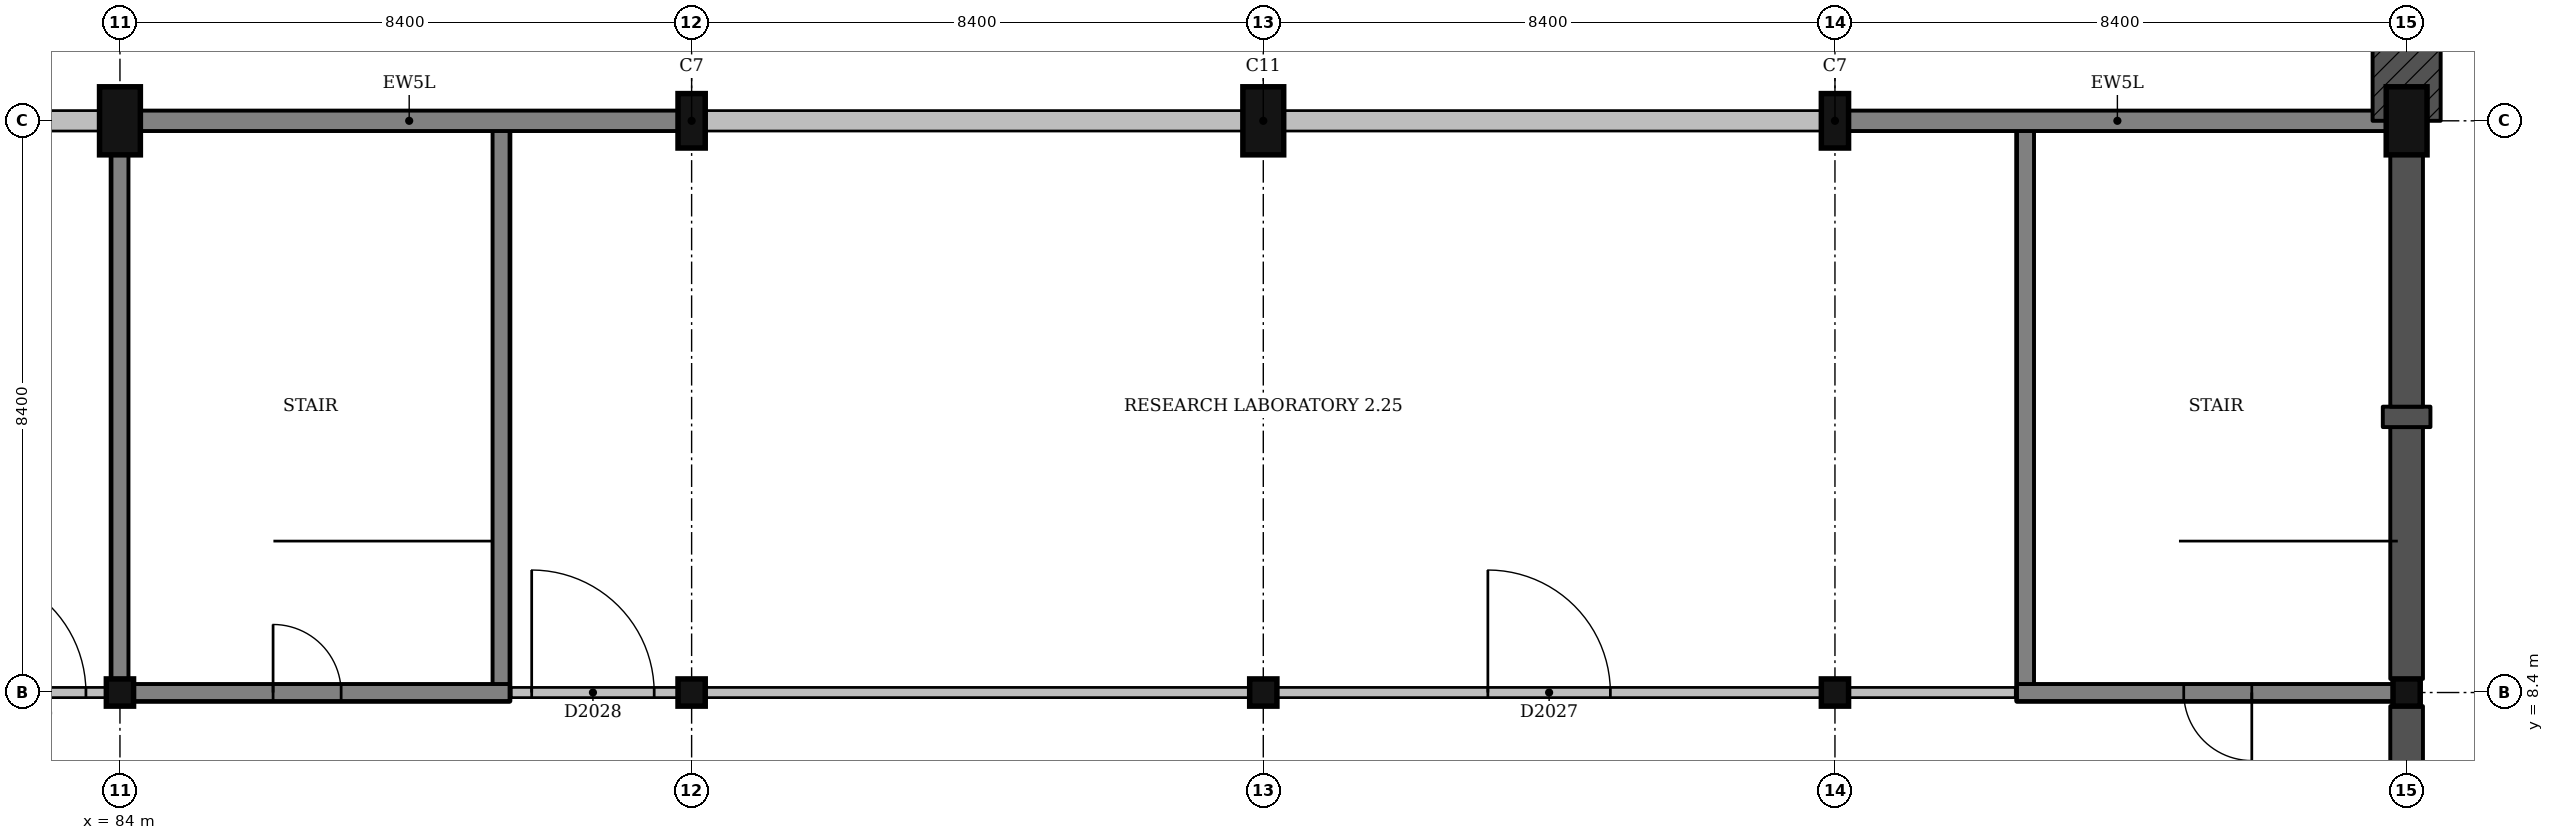
"""IFC4 building model, lengths in metres.
Left out: names, types, materials, properties, quantities, classifications, styles, units other than length and angle.
Written with IfcOpenShell. Run it as: python <this file> out.ifc"""

import sys

from ifc_helpers import new_model, si_unit, direction, frame, frame_2d, origin, origin_2d, place, context, subcontext, project, spatial, polyline, rectangle, outline, extrude, element, fill, save


model = new_model("IFC4")
c1 = context("Model", 3, precision=1e-05, world=origin(), true_north=direction((0.0, 1.0)))
c2 = subcontext(c1, "Body", "Model", "MODEL_VIEW")
j1 = project(units=[si_unit("LENGTHUNIT", "METRE"), si_unit("PLANEANGLEUNIT", "RADIAN")], contexts=[c1])
p1 = place(None, origin())
s1 = spatial("IfcSite", under=j1, at=p1, CompositionType="ELEMENT")
p2 = place(p1, origin())
s2 = spatial("IfcBuilding", under=s1, at=p2, CompositionType="ELEMENT")
p3 = place(p2, frame((0.0, 0.0, 9.0)))
s3 = spatial("IfcBuildingStorey", under=s2, at=p3, CompositionType="ELEMENT", Elevation=9.0)
p4 = place(p3, frame((84.0, 8.4, 0.0), z_axis=(0.0, 0.0, 1.0), x_axis=(1.0, 0.0, 0.0)))
e1 = element("IfcColumn", 1, at=p4, inside=s3, PredefinedType="COLUMN", context=c2, shape_type="SweptSolid", body=[
    extrude(rectangle(XDim=0.4, YDim=0.4, at=origin_2d()), origin(), (0.0, 0.0, 1.0), 4.5),
])
p5 = place(p3, frame((84.0, 16.8, 0.0), z_axis=(0.0, 0.0, 1.0), x_axis=(1.0, 0.0, 0.0)))
e2 = element("IfcColumn", 2, at=p5, inside=s3, PredefinedType="COLUMN", context=c2, shape_type="SweptSolid", body=[
    extrude(rectangle(XDim=0.6, YDim=1.0, at=origin_2d()), origin(), (0.0, 0.0, 1.0), 4.5),
])
p6 = place(p3, frame((92.4, 8.4, 0.0), z_axis=(0.0, 0.0, 1.0), x_axis=(1.0, 0.0, 0.0)))
e3 = element("IfcColumn", 3, at=p6, inside=s3, PredefinedType="COLUMN", context=c2, shape_type="SweptSolid", body=[
    extrude(rectangle(XDim=0.4, YDim=0.4, at=origin_2d()), origin(), (0.0, 0.0, 1.0), 4.5),
])
p7 = place(p3, frame((92.4, 16.8, 0.0), z_axis=(0.0, 0.0, 1.0), x_axis=(1.0, 0.0, 0.0)))
e4 = element("IfcColumn", 4, at=p7, inside=s3, PredefinedType="COLUMN", context=c2, shape_type="SweptSolid", body=[
    extrude(rectangle(XDim=0.4, YDim=0.8, at=origin_2d()), origin(), (0.0, 0.0, 1.0), 4.5),
])
p8 = place(p3, frame((100.8, 8.4, 0.0), z_axis=(0.0, 0.0, 1.0), x_axis=(1.0, 0.0, 0.0)))
e5 = element("IfcColumn", 5, at=p8, inside=s3, PredefinedType="COLUMN", context=c2, shape_type="SweptSolid", body=[
    extrude(rectangle(XDim=0.4, YDim=0.4, at=origin_2d()), origin(), (0.0, 0.0, 1.0), 4.5),
])
p9 = place(p3, frame((100.8, 16.8, 0.0), z_axis=(0.0, 0.0, 1.0), x_axis=(1.0, 0.0, 0.0)))
e6 = element("IfcColumn", 6, at=p9, inside=s3, PredefinedType="COLUMN", context=c2, shape_type="SweptSolid", body=[
    extrude(rectangle(XDim=0.6, YDim=1.0, at=origin_2d()), origin(), (0.0, 0.0, 1.0), 4.5),
])
p10 = place(p3, frame((109.2, 8.4, 0.0), z_axis=(0.0, 0.0, 1.0), x_axis=(1.0, 0.0, 0.0)))
e7 = element("IfcColumn", 7, at=p10, inside=s3, PredefinedType="COLUMN", context=c2, shape_type="SweptSolid", body=[
    extrude(rectangle(XDim=0.4, YDim=0.4, at=origin_2d()), origin(), (0.0, 0.0, 1.0), 4.5),
])
p11 = place(p3, frame((109.2, 16.8, 0.0), z_axis=(0.0, 0.0, 1.0), x_axis=(1.0, 0.0, 0.0)))
e8 = element("IfcColumn", 8, at=p11, inside=s3, PredefinedType="COLUMN", context=c2, shape_type="SweptSolid", body=[
    extrude(rectangle(XDim=0.4, YDim=0.8, at=origin_2d()), origin(), (0.0, 0.0, 1.0), 4.5),
])
p12 = place(p3, frame((117.6, 8.4, 0.0), z_axis=(0.0, 0.0, 1.0), x_axis=(1.0, 0.0, 0.0)))
e9 = element("IfcColumn", 9, at=p12, inside=s3, PredefinedType="COLUMN", context=c2, shape_type="SweptSolid", body=[
    extrude(rectangle(XDim=0.4, YDim=0.4, at=origin_2d()), origin(), (0.0, 0.0, 1.0), 4.5),
])
p13 = place(p3, frame((117.6, 16.8, 0.0), z_axis=(0.0, 0.0, 1.0), x_axis=(1.0, 0.0, 0.0)))
e10 = element("IfcColumn", 10, at=p13, inside=s3, PredefinedType="COLUMN", context=c2, shape_type="SweptSolid", body=[
    extrude(rectangle(XDim=0.6, YDim=1.0, at=origin_2d()), origin(), (0.0, 0.0, 1.0), 4.5),
])
p14 = place(p3, frame((111.875, 8.4, 0.0), z_axis=(0.0, 0.0, 1.0), x_axis=(1.0, 0.0, 0.0)))
e11 = element("IfcWall", 11, at=p14, inside=s3, PredefinedType="SHEAR", context=c2, shape_type="SweptSolid", body=[
    extrude(rectangle(XDim=5.525, YDim=0.25, at=frame_2d((2.762, 0.0))), origin(), (0.0, 0.0, 1.0), 4.2),
])
p15 = place(p14, frame((2.45, 0.0, 0.0)))
e12 = element("IfcOpeningElement", 12, at=p15, cuts=e11, PredefinedType="OPENING", context=c2, shape_type="SweptSolid", body=[
    extrude(rectangle(XDim=1.0, YDim=2.1, at=frame_2d((0.5, 1.05))), frame((0.0, 0.135, 0.0), z_axis=(0.0, -1.0, 0.0), x_axis=(1.0, 0.0, 0.0)), (0.0, 0.0, 1.0), 0.27),
])
p16 = place(p3, frame((112.0, 8.525, 0.0), z_axis=(0.0, 0.0, 1.0), x_axis=(0.0, 1.0, 0.0)))
e13 = element("IfcWall", 13, at=p16, inside=s3, PredefinedType="SHEAR", context=c2, shape_type="SweptSolid", body=[
    extrude(rectangle(XDim=8.15, YDim=0.25, at=frame_2d((4.075, 0.0))), origin(), (0.0, 0.0, 1.0), 4.2),
])
p17 = place(p3, frame((84.2, 8.4, 0.0), z_axis=(0.0, 0.0, 1.0), x_axis=(1.0, 0.0, 0.0)))
e14 = element("IfcWall", 14, at=p17, inside=s3, PredefinedType="SHEAR", context=c2, shape_type="SweptSolid", body=[
    extrude(rectangle(XDim=5.525, YDim=0.25, at=frame_2d((2.763, 0.0))), origin(), (0.0, 0.0, 1.0), 4.2),
])
p18 = place(p17, frame((2.05, 0.0, 0.0)))
e15 = element("IfcOpeningElement", 15, at=p18, cuts=e14, PredefinedType="OPENING", context=c2, shape_type="SweptSolid", body=[
    extrude(rectangle(XDim=1.0, YDim=2.1, at=frame_2d((0.5, 1.05))), frame((0.0, 0.135, 0.0), z_axis=(0.0, -1.0, 0.0), x_axis=(1.0, 0.0, 0.0)), (0.0, 0.0, 1.0), 0.27),
])
p19 = place(p3, frame((84.0, 8.6, 0.0), z_axis=(0.0, 0.0, 1.0), x_axis=(0.0, 1.0, 0.0)))
e16 = element("IfcWall", 16, at=p19, inside=s3, PredefinedType="SHEAR", context=c2, shape_type="SweptSolid", body=[
    extrude(rectangle(XDim=7.7, YDim=0.25, at=frame_2d((3.85, 0.0))), origin(), (0.0, 0.0, 1.0), 4.2),
])
p20 = place(p3, frame((89.6, 8.525, 0.0), z_axis=(0.0, 0.0, 1.0), x_axis=(0.0, 1.0, 0.0)))
e17 = element("IfcWall", 17, at=p20, inside=s3, PredefinedType="SHEAR", context=c2, shape_type="SweptSolid", body=[
    extrude(rectangle(XDim=8.15, YDim=0.25, at=frame_2d((4.075, 0.0))), origin(), (0.0, 0.0, 1.0), 4.2),
])
p21 = place(p3, frame((117.6, 16.8, 2.0), z_axis=(0.0, 0.0, 1.0), x_axis=(0.0, 1.0, 0.0)))
e18 = element("IfcWall", 18, at=p21, inside=s3, PredefinedType="SOLIDWALL", context=c2, shape_type="SweptSolid", body=[
    extrude(outline(polyline([(0.0, 0.0), (33.6, 0.0), (33.6, 16.5), (31.5, 15.753), (29.4, 15.115), (27.3, 14.583), (25.2, 14.152), (23.1, 13.819), (21.0, 13.583), (18.9, 13.442), (16.8, 13.395), (14.7, 13.442), (12.6, 13.583), (10.5, 13.819), (8.4, 14.152), (6.3, 14.583), (4.2, 15.115), (2.1, 15.753), (0.0, 16.5), (0.0, 0.0)])), frame((0.0, 0.5, 0.0), z_axis=(0.0, -1.0, 0.0), x_axis=(1.0, 0.0, 0.0)), (0.0, 0.0, 1.0), 1.0),
])
p22 = place(p3, frame((117.6, 4.35, 0.0), z_axis=(0.0, 0.0, 1.0), x_axis=(0.0, 1.0, 0.0)))
e19 = element("IfcWall", 19, at=p22, inside=s3, PredefinedType="SOLIDWALL", context=c2, shape_type="SweptSolid", body=[
    extrude(rectangle(XDim=3.85, YDim=0.48, at=frame_2d((1.925, 0.0))), origin(), (0.0, 0.0, 1.0), 3.6),
])
p23 = place(p3, frame((117.6, 8.6, 0.0), z_axis=(0.0, 0.0, 1.0), x_axis=(0.0, 1.0, 0.0)))
e20 = element("IfcWall", 20, at=p23, inside=s3, PredefinedType="SOLIDWALL", context=c2, shape_type="SweptSolid", body=[
    extrude(rectangle(XDim=3.7, YDim=0.48, at=frame_2d((1.85, 0.0))), origin(), (0.0, 0.0, 1.0), 4.2),
])
p24 = place(p3, frame((117.6, 12.3, 0.0), z_axis=(0.0, 0.0, 1.0), x_axis=(0.0, 1.0, 0.0)))
e21 = element("IfcWall", 21, at=p24, inside=s3, PredefinedType="SOLIDWALL", context=c2, shape_type="SweptSolid", body=[
    extrude(rectangle(XDim=0.3, YDim=0.7, at=frame_2d((0.15, 0.0))), origin(), (0.0, 0.0, 1.0), 4.2),
])
p25 = place(p3, frame((117.6, 12.6, 0.0), z_axis=(0.0, 0.0, 1.0), x_axis=(0.0, 1.0, 0.0)))
e22 = element("IfcWall", 22, at=p25, inside=s3, PredefinedType="SOLIDWALL", context=c2, shape_type="SweptSolid", body=[
    extrude(rectangle(XDim=3.7, YDim=0.48, at=frame_2d((1.85, 0.0))), origin(), (0.0, 0.0, 1.0), 4.2),
])
p26 = place(p3, frame((117.3, 16.8, 0.0), z_axis=(0.0, 0.0, 1.0), x_axis=(-1.0, 0.0, 0.0)))
e23 = element("IfcWall", 23, at=p26, inside=s3, PredefinedType="SOLIDWALL", context=c2, shape_type="SweptSolid", body=[
    extrude(rectangle(XDim=7.9, YDim=0.3, at=frame_2d((3.95, 0.0))), origin(), (0.0, 0.0, 1.0), 3.6),
])
for number, where, z_axis, x_axis in (
    (24, (109.0, 16.8, 0.0), (0.0, 0.0, 1.0), (-1.0, 0.0, 0.0)),
    (25, (100.5, 16.8, 0.0), (0.0, 0.0, 1.0), (-1.0, 0.0, 0.0)),
    (26, (92.2, 16.8, 0.0), (0.0, 0.0, 1.0), (-1.0, 0.0, 0.0)),
    (27, (83.7, 16.8, 0.0), (0.0, 0.0, 1.0), (-1.0, 0.0, 0.0)),
):
    element("IfcWall", number, at=place(p3, frame(where, z_axis=z_axis, x_axis=x_axis)), inside=s3, PredefinedType="SOLIDWALL", context=c2, shape_type="SweptSolid", body=[
        extrude(rectangle(XDim=7.9, YDim=0.3, at=frame_2d((3.95, 0.0))), origin(), (0.0, 0.0, 1.0), 3.6),
    ])
p27 = place(p3, frame((75.8, 8.4, 0.0), z_axis=(0.0, 0.0, 1.0), x_axis=(1.0, 0.0, 0.0)))
e28 = element("IfcWall", 28, at=p27, inside=s3, PredefinedType="PARTITIONING", context=c2, shape_type="SweptSolid", body=[
    extrude(rectangle(XDim=8.0, YDim=0.15, at=frame_2d((4.0, 0.0))), origin(), (0.0, 0.0, 1.0), 3.6),
])
p28 = place(p27, frame((5.9, 0.0, 0.0)))
e29 = element("IfcOpeningElement", 29, at=p28, cuts=e28, PredefinedType="OPENING", context=c2, shape_type="SweptSolid", body=[
    extrude(rectangle(XDim=1.8, YDim=2.1, at=frame_2d((0.9, 1.05))), frame((0.0, 0.085, 0.0), z_axis=(0.0, -1.0, 0.0), x_axis=(1.0, 0.0, 0.0)), (0.0, 0.0, 1.0), 0.17),
])
p29 = place(p3, frame((89.75, 8.4, 0.0), z_axis=(0.0, 0.0, 1.0), x_axis=(1.0, 0.0, 0.0)))
e30 = element("IfcWall", 30, at=p29, inside=s3, PredefinedType="PARTITIONING", context=c2, shape_type="SweptSolid", body=[
    extrude(rectangle(XDim=2.45, YDim=0.15, at=frame_2d((1.225, 0.0))), origin(), (0.0, 0.0, 1.0), 3.6),
])
p30 = place(p29, frame((0.3, 0.0, 0.0)))
e31 = element("IfcOpeningElement", 31, at=p30, cuts=e30, PredefinedType="OPENING", context=c2, shape_type="SweptSolid", body=[
    extrude(rectangle(XDim=1.8, YDim=2.1, at=frame_2d((0.9, 1.05))), frame((0.0, 0.085, 0.0), z_axis=(0.0, -1.0, 0.0), x_axis=(1.0, 0.0, 0.0)), (0.0, 0.0, 1.0), 0.17),
])
p31 = place(p3, frame((92.6, 8.4, 0.0), z_axis=(0.0, 0.0, 1.0), x_axis=(1.0, 0.0, 0.0)))
e32 = element("IfcWall", 32, at=p31, inside=s3, PredefinedType="PARTITIONING", context=c2, shape_type="SweptSolid", body=[
    extrude(rectangle(XDim=8.0, YDim=0.15, at=frame_2d((4.0, 0.0))), origin(), (0.0, 0.0, 1.0), 3.6),
])
p32 = place(p3, frame((101.0, 8.4, 0.0), z_axis=(0.0, 0.0, 1.0), x_axis=(1.0, 0.0, 0.0)))
e33 = element("IfcWall", 33, at=p32, inside=s3, PredefinedType="PARTITIONING", context=c2, shape_type="SweptSolid", body=[
    extrude(rectangle(XDim=8.0, YDim=0.15, at=frame_2d((4.0, 0.0))), origin(), (0.0, 0.0, 1.0), 3.6),
])
p33 = place(p32, frame((3.1, 0.0, 0.0)))
e34 = element("IfcOpeningElement", 34, at=p33, cuts=e33, PredefinedType="OPENING", context=c2, shape_type="SweptSolid", body=[
    extrude(rectangle(XDim=1.8, YDim=2.1, at=frame_2d((0.9, 1.05))), frame((0.0, 0.085, 0.0), z_axis=(0.0, -1.0, 0.0), x_axis=(1.0, 0.0, 0.0)), (0.0, 0.0, 1.0), 0.17),
])
p34 = place(p3, frame((109.4, 8.4, 0.0), z_axis=(0.0, 0.0, 1.0), x_axis=(1.0, 0.0, 0.0)))
e35 = element("IfcWall", 35, at=p34, inside=s3, PredefinedType="PARTITIONING", context=c2, shape_type="SweptSolid", body=[
    extrude(rectangle(XDim=2.45, YDim=0.15, at=frame_2d((1.225, 0.0))), origin(), (0.0, 0.0, 1.0), 3.6),
])
p35 = place(p28, origin())
e36 = element("IfcDoor", 36, at=p35, inside=s3, OperationType="DOUBLE_DOOR_SINGLE_SWING", PredefinedType="DOOR", context=c2, shape_type="SweptSolid", body=[
    extrude(rectangle(XDim=1.8, YDim=2.1, at=frame_2d((0.9, 1.05))), frame((0.0, 0.025, 0.0), z_axis=(0.0, -1.0, 0.0), x_axis=(1.0, 0.0, 0.0)), (0.0, 0.0, 1.0), 0.05),
])
fill(e29, e36)
p36 = place(p33, origin())
e37 = element("IfcDoor", 37, at=p36, inside=s3, OperationType="DOUBLE_DOOR_SINGLE_SWING", PredefinedType="DOOR", context=c2, shape_type="SweptSolid", body=[
    extrude(rectangle(XDim=1.8, YDim=2.1, at=frame_2d((0.9, 1.05))), frame((0.0, 0.025, 0.0), z_axis=(0.0, -1.0, 0.0), x_axis=(1.0, 0.0, 0.0)), (0.0, 0.0, 1.0), 0.05),
])
fill(e34, e37)
p37 = place(p30, origin())
e38 = element("IfcDoor", 38, at=p37, inside=s3, OperationType="DOUBLE_DOOR_SINGLE_SWING", PredefinedType="DOOR", context=c2, shape_type="SweptSolid", body=[
    extrude(rectangle(XDim=1.8, YDim=2.1, at=frame_2d((0.9, 1.05))), frame((0.0, 0.025, 0.0), z_axis=(0.0, -1.0, 0.0), x_axis=(1.0, 0.0, 0.0)), (0.0, 0.0, 1.0), 0.05),
])
fill(e31, e38)
p38 = place(p18, origin())
e39 = element("IfcDoor", 39, at=p38, inside=s3, OperationType="SINGLE_SWING_LEFT", PredefinedType="DOOR", context=c2, shape_type="SweptSolid", body=[
    extrude(rectangle(XDim=1.0, YDim=2.1, at=frame_2d((0.5, 1.05))), frame((0.0, 0.025, 0.0), z_axis=(0.0, -1.0, 0.0), x_axis=(1.0, 0.0, 0.0)), (0.0, 0.0, 1.0), 0.05),
])
fill(e15, e39)
p39 = place(p15, origin())
e40 = element("IfcDoor", 40, at=p39, inside=s3, OperationType="SINGLE_SWING_RIGHT", PredefinedType="DOOR", context=c2, shape_type="SweptSolid", body=[
    extrude(rectangle(XDim=1.0, YDim=2.1, at=frame_2d((0.5, 1.05))), frame((0.0, 0.025, 0.0), z_axis=(0.0, -1.0, 0.0), x_axis=(1.0, 0.0, 0.0)), (0.0, 0.0, 1.0), 0.05),
])
fill(e12, e40)
save(model, sys.argv[1])
